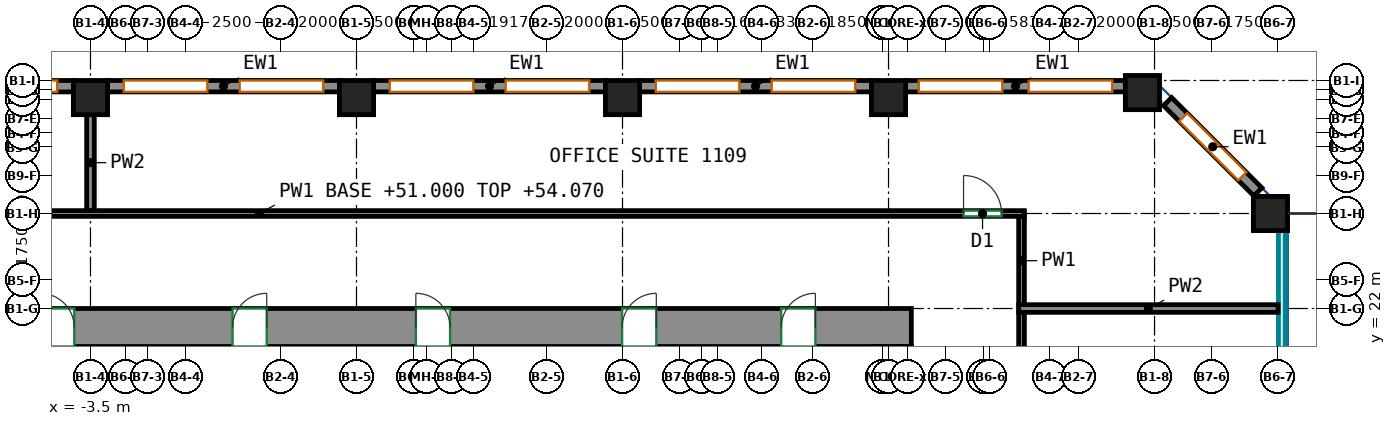
"""IFC4 building model, lengths in metres.
Left out: names, types, materials, properties, quantities, classifications, styles, units other than length and angle.
Written with IfcOpenShell. Run it as: python <this file> out.ifc"""

import sys

from ifc_helpers import new_model, si_unit, direction, frame, frame_2d, origin, origin_2d, place, context, subcontext, project, spatial, rectangle, extrude, source, transform, mapped, element, fill, save


model = new_model("IFC4")
c1 = context("Model", 3, precision=1e-05, world=origin(), true_north=direction((0.0, 1.0)))
c2 = subcontext(c1, "Body", "Model", "MODEL_VIEW")
j1 = project(units=[si_unit("LENGTHUNIT", "METRE"), si_unit("PLANEANGLEUNIT", "RADIAN")], contexts=[c1])
p1 = place(None, origin())
s1 = spatial("IfcSite", under=j1, at=p1, CompositionType="ELEMENT")
p2 = place(p1, origin())
s2 = spatial("IfcBuilding", under=s1, at=p2, CompositionType="ELEMENT")
p3 = place(p2, frame((0.0, 0.0, 51.0)))
s3 = spatial("IfcBuildingStorey", under=s2, at=p3, CompositionType="ELEMENT", Elevation=51.0)
m1 = source(origin(), c2, "Body", "SweptSolid", [
    extrude(rectangle(XDim=0.9, YDim=0.9, at=origin_2d()), origin(), (0.0, 0.0, 1.0), 3.72),
])
for number, where, z_axis, x_axis in (
    (1, (-3.5, 27.55, 0.0), (0.0, 0.0, 1.0), (1.0, 0.0, 0.0)),
    (2, (3.5, 27.55, 0.0), (0.0, 0.0, 1.0), (1.0, 0.0, 0.0)),
    (3, (10.5, 27.55, 0.0), (0.0, 0.0, 1.0), (1.0, 0.0, 0.0)),
    (4, (17.5, 27.55, 0.0), (0.0, 0.0, 1.0), (1.0, 0.0, 0.0)),
    (5, (24.182, 27.682, 0.0), (0.0, 0.0, 1.0), (1.0, 0.0, 0.0)),
    (6, (27.55, 24.5, 0.0), (0.0, 0.0, 1.0), (1.0, 0.0, 0.0)),
):
    element("IfcColumn", number, at=place(p3, frame(where, z_axis=z_axis, x_axis=x_axis)), inside=s3, PredefinedType="COLUMN", context=c2, shape_type="MappedRepresentation", body=[
        mapped(m1, transform((0.0, 0.0, 0.0))),
    ])
m2 = source(origin(), c2, "Body", "SweptSolid", [
    extrude(rectangle(XDim=34.1, YDim=1.0, at=frame_2d((17.05, 0.0))), origin(), (0.0, 0.0, 1.0), 3.72),
])
p4 = place(p3, frame((-16.0, 21.5, 0.0), z_axis=(0.0, 0.0, 1.0), x_axis=(1.0, 0.0, 0.0)))
e7 = element("IfcWall", 7, at=p4, inside=s3, PredefinedType="SHEAR", context=c2, shape_type="MappedRepresentation", body=[
    mapped(m2, transform((0.0, 0.0, 0.0))),
])
p5 = place(p4, frame((6.108, 0.0, 0.0)))
e8 = element("IfcOpeningElement", 8, at=p5, cuts=e7, PredefinedType="OPENING", context=c2, shape_type="SweptSolid", body=[
    extrude(rectangle(XDim=0.9, YDim=2.1, at=frame_2d((0.45, 1.05))), frame((0.0, 0.51, 0.0), z_axis=(0.0, -1.0, 0.0), x_axis=(1.0, 0.0, 0.0)), (0.0, 0.0, 1.0), 1.02),
])
p6 = place(p4, frame((11.173, 0.0, 0.0)))
e9 = element("IfcOpeningElement", 9, at=p6, cuts=e7, PredefinedType="OPENING", context=c2, shape_type="SweptSolid", body=[
    extrude(rectangle(XDim=0.9, YDim=2.1, at=frame_2d((0.45, 1.05))), frame((0.0, 0.51, 0.0), z_axis=(0.0, -1.0, 0.0), x_axis=(1.0, 0.0, 0.0)), (0.0, 0.0, 1.0), 1.02),
])
p7 = place(p4, frame((16.238, 0.0, 0.0)))
e10 = element("IfcOpeningElement", 10, at=p7, cuts=e7, PredefinedType="OPENING", context=c2, shape_type="SweptSolid", body=[
    extrude(rectangle(XDim=0.9, YDim=2.1, at=frame_2d((0.45, 1.05))), frame((0.0, 0.51, 0.0), z_axis=(0.0, -1.0, 0.0), x_axis=(1.0, 0.0, 0.0)), (0.0, 0.0, 1.0), 1.02),
])
p8 = place(p4, frame((21.062, 0.0, 0.0)))
e11 = element("IfcOpeningElement", 11, at=p8, cuts=e7, PredefinedType="OPENING", context=c2, shape_type="SweptSolid", body=[
    extrude(rectangle(XDim=0.9, YDim=2.1, at=frame_2d((0.45, 1.05))), frame((0.0, 0.51, 0.0), z_axis=(0.0, -1.0, 0.0), x_axis=(1.0, 0.0, 0.0)), (0.0, 0.0, 1.0), 1.02),
])
p9 = place(p4, frame((26.489, 0.0, 0.0)))
e12 = element("IfcOpeningElement", 12, at=p9, cuts=e7, PredefinedType="OPENING", context=c2, shape_type="SweptSolid", body=[
    extrude(rectangle(XDim=0.9, YDim=2.1, at=frame_2d((0.45, 1.05))), frame((0.0, 0.51, 0.0), z_axis=(0.0, -1.0, 0.0), x_axis=(1.0, 0.0, 0.0)), (0.0, 0.0, 1.0), 1.02),
])
p10 = place(p4, frame((2.525, 0.0, 0.0)))
e13 = element("IfcOpeningElement", 13, at=p10, cuts=e7, PredefinedType="OPENING", context=c2, shape_type="SweptSolid", body=[
    extrude(rectangle(XDim=0.9, YDim=2.1, at=frame_2d((0.45, 1.05))), frame((0.0, 0.51, 0.0), z_axis=(0.0, -1.0, 0.0), x_axis=(1.0, 0.0, 0.0)), (0.0, 0.0, 1.0), 1.02),
])
p11 = place(p4, frame((30.675, 0.0, 0.0)))
e14 = element("IfcOpeningElement", 14, at=p11, cuts=e7, PredefinedType="OPENING", context=c2, shape_type="SweptSolid", body=[
    extrude(rectangle(XDim=0.9, YDim=2.1, at=frame_2d((0.45, 1.05))), frame((0.0, 0.51, 0.0), z_axis=(0.0, -1.0, 0.0), x_axis=(1.0, 0.0, 0.0)), (0.0, 0.0, 1.0), 1.02),
])
m3 = source(origin(), c2, "Body", "SweptSolid", [
    extrude(rectangle(XDim=3.359, YDim=0.3, at=frame_2d((1.679, 0.0))), origin(), (0.0, 0.0, 1.0), 3.72),
])
p12 = place(p3, frame((27.219, 25.069, 0.0), z_axis=(0.0, 0.0, 1.0), x_axis=(-0.707070438228, 0.707143122278, 0.0)))
e15 = element("IfcWall", 15, at=p12, inside=s3, PredefinedType="SOLIDWALL", context=c2, shape_type="MappedRepresentation", body=[
    mapped(m3, transform((0.0, 0.0, 0.0))),
])
p13 = place(p12, frame((0.579, 0.0, 0.7)))
e16 = element("IfcOpeningElement", 16, at=p13, cuts=e15, PredefinedType="OPENING", context=c2, shape_type="SweptSolid", body=[
    extrude(rectangle(XDim=2.2, YDim=2.25, at=frame_2d((1.1, 1.125))), frame((0.0, 0.16, 0.0), z_axis=(0.0, -1.0, 0.0), x_axis=(1.0, 0.0, 0.0)), (0.0, 0.0, 1.0), 0.32),
])
m4 = source(origin(), c2, "Body", "SweptSolid", [
    extrude(rectangle(XDim=5.782, YDim=0.3, at=frame_2d((2.891, 0.0))), origin(), (0.0, 0.0, 1.0), 3.72),
])
p14 = place(p3, frame((23.732, 27.85, 0.0), z_axis=(0.0, 0.0, 1.0), x_axis=(-1.0, 0.0, 0.0)))
e17 = element("IfcWall", 17, at=p14, inside=s3, PredefinedType="SOLIDWALL", context=c2, shape_type="MappedRepresentation", body=[
    mapped(m4, transform((0.0, 0.0, 0.0))),
])
p15 = place(p14, frame((0.345, 0.0, 0.7)))
e18 = element("IfcOpeningElement", 18, at=p15, cuts=e17, PredefinedType="OPENING", context=c2, shape_type="SweptSolid", body=[
    extrude(rectangle(XDim=2.2, YDim=2.25, at=frame_2d((1.1, 1.125))), frame((0.0, 0.16, 0.0), z_axis=(0.0, -1.0, 0.0), x_axis=(1.0, 0.0, 0.0)), (0.0, 0.0, 1.0), 0.32),
])
p16 = place(p14, frame((3.236, 0.0, 0.7)))
e19 = element("IfcOpeningElement", 19, at=p16, cuts=e17, PredefinedType="OPENING", context=c2, shape_type="SweptSolid", body=[
    extrude(rectangle(XDim=2.2, YDim=2.25, at=frame_2d((1.1, 1.125))), frame((0.0, 0.16, 0.0), z_axis=(0.0, -1.0, 0.0), x_axis=(1.0, 0.0, 0.0)), (0.0, 0.0, 1.0), 0.32),
])
m5 = source(origin(), c2, "Body", "SweptSolid", [
    extrude(rectangle(XDim=6.1, YDim=0.3, at=frame_2d((3.05, 0.0))), origin(), (0.0, 0.0, 1.0), 3.72),
])
p17 = place(p3, frame((17.05, 27.85, 0.0), z_axis=(0.0, 0.0, 1.0), x_axis=(-1.0, 0.0, 0.0)))
e20 = element("IfcWall", 20, at=p17, inside=s3, PredefinedType="SOLIDWALL", context=c2, shape_type="MappedRepresentation", body=[
    mapped(m5, transform((0.0, 0.0, 0.0))),
])
p18 = place(p17, frame((0.425, 0.0, 0.7)))
e21 = element("IfcOpeningElement", 21, at=p18, cuts=e20, PredefinedType="OPENING", context=c2, shape_type="SweptSolid", body=[
    extrude(rectangle(XDim=2.2, YDim=2.25, at=frame_2d((1.1, 1.125))), frame((0.0, 0.16, 0.0), z_axis=(0.0, -1.0, 0.0), x_axis=(1.0, 0.0, 0.0)), (0.0, 0.0, 1.0), 0.32),
])
p19 = place(p17, frame((3.475, 0.0, 0.7)))
e22 = element("IfcOpeningElement", 22, at=p19, cuts=e20, PredefinedType="OPENING", context=c2, shape_type="SweptSolid", body=[
    extrude(rectangle(XDim=2.2, YDim=2.25, at=frame_2d((1.1, 1.125))), frame((0.0, 0.16, 0.0), z_axis=(0.0, -1.0, 0.0), x_axis=(1.0, 0.0, 0.0)), (0.0, 0.0, 1.0), 0.32),
])
p20 = place(p3, frame((10.05, 27.85, 0.0), z_axis=(0.0, 0.0, 1.0), x_axis=(-1.0, 0.0, 0.0)))
e23 = element("IfcWall", 23, at=p20, inside=s3, PredefinedType="SOLIDWALL", context=c2, shape_type="MappedRepresentation", body=[
    mapped(m5, transform((0.0, 0.0, 0.0))),
])
p21 = place(p20, frame((0.425, 0.0, 0.7)))
e24 = element("IfcOpeningElement", 24, at=p21, cuts=e23, PredefinedType="OPENING", context=c2, shape_type="SweptSolid", body=[
    extrude(rectangle(XDim=2.2, YDim=2.25, at=frame_2d((1.1, 1.125))), frame((0.0, 0.16, 0.0), z_axis=(0.0, -1.0, 0.0), x_axis=(1.0, 0.0, 0.0)), (0.0, 0.0, 1.0), 0.32),
])
p22 = place(p20, frame((3.475, 0.0, 0.7)))
e25 = element("IfcOpeningElement", 25, at=p22, cuts=e23, PredefinedType="OPENING", context=c2, shape_type="SweptSolid", body=[
    extrude(rectangle(XDim=2.2, YDim=2.25, at=frame_2d((1.1, 1.125))), frame((0.0, 0.16, 0.0), z_axis=(0.0, -1.0, 0.0), x_axis=(1.0, 0.0, 0.0)), (0.0, 0.0, 1.0), 0.32),
])
p23 = place(p3, frame((3.05, 27.85, 0.0), z_axis=(0.0, 0.0, 1.0), x_axis=(-1.0, 0.0, 0.0)))
e26 = element("IfcWall", 26, at=p23, inside=s3, PredefinedType="SOLIDWALL", context=c2, shape_type="MappedRepresentation", body=[
    mapped(m5, transform((0.0, 0.0, 0.0))),
])
p24 = place(p23, frame((0.425, 0.0, 0.7)))
e27 = element("IfcOpeningElement", 27, at=p24, cuts=e26, PredefinedType="OPENING", context=c2, shape_type="SweptSolid", body=[
    extrude(rectangle(XDim=2.2, YDim=2.25, at=frame_2d((1.1, 1.125))), frame((0.0, 0.16, 0.0), z_axis=(0.0, -1.0, 0.0), x_axis=(1.0, 0.0, 0.0)), (0.0, 0.0, 1.0), 0.32),
])
p25 = place(p23, frame((3.475, 0.0, 0.7)))
e28 = element("IfcOpeningElement", 28, at=p25, cuts=e26, PredefinedType="OPENING", context=c2, shape_type="SweptSolid", body=[
    extrude(rectangle(XDim=2.2, YDim=2.25, at=frame_2d((1.1, 1.125))), frame((0.0, 0.16, 0.0), z_axis=(0.0, -1.0, 0.0), x_axis=(1.0, 0.0, 0.0)), (0.0, 0.0, 1.0), 0.32),
])
p26 = place(p3, frame((-3.95, 27.85, 0.0), z_axis=(0.0, 0.0, 1.0), x_axis=(-1.0, 0.0, 0.0)))
e29 = element("IfcWall", 29, at=p26, inside=s3, PredefinedType="SOLIDWALL", context=c2, shape_type="MappedRepresentation", body=[
    mapped(m5, transform((0.0, 0.0, 0.0))),
])
p27 = place(p26, frame((0.425, 0.0, 0.7)))
e30 = element("IfcOpeningElement", 30, at=p27, cuts=e29, PredefinedType="OPENING", context=c2, shape_type="SweptSolid", body=[
    extrude(rectangle(XDim=2.2, YDim=2.25, at=frame_2d((1.1, 1.125))), frame((0.0, 0.16, 0.0), z_axis=(0.0, -1.0, 0.0), x_axis=(1.0, 0.0, 0.0)), (0.0, 0.0, 1.0), 0.32),
])
p28 = place(p26, frame((3.475, 0.0, 0.7)))
e31 = element("IfcOpeningElement", 31, at=p28, cuts=e29, PredefinedType="OPENING", context=c2, shape_type="SweptSolid", body=[
    extrude(rectangle(XDim=2.2, YDim=2.25, at=frame_2d((1.1, 1.125))), frame((0.0, 0.16, 0.0), z_axis=(0.0, -1.0, 0.0), x_axis=(1.0, 0.0, 0.0)), (0.0, 0.0, 1.0), 0.32),
])
p29 = place(p3, frame((21.0, 17.75, 0.0), z_axis=(0.0, 0.0, 1.0), x_axis=(0.0, 1.0, 0.0)))
e32 = element("IfcWall", 32, at=p29, inside=s3, PredefinedType="PARTITIONING", context=c2, shape_type="SweptSolid", body=[
    extrude(rectangle(XDim=4.16, YDim=0.15, at=frame_2d((2.08, 0.0))), origin(), (0.0, 0.0, 1.0), 3.72),
])
p30 = place(p3, frame((21.0, 22.09, 0.0), z_axis=(0.0, 0.0, 1.0), x_axis=(0.0, 1.0, 0.0)))
e33 = element("IfcWall", 33, at=p30, inside=s3, PredefinedType="PARTITIONING", context=c2, shape_type="SweptSolid", body=[
    extrude(rectangle(XDim=2.335, YDim=0.15, at=frame_2d((1.167, 0.0))), origin(), (0.0, 0.0, 1.0), 3.72),
])
p31 = place(p3, frame((-19.2, 24.5, 0.0), z_axis=(0.0, 0.0, 1.0), x_axis=(1.0, 0.0, 0.0)))
e34 = element("IfcWall", 34, at=p31, inside=s3, PredefinedType="PARTITIONING", context=c2, shape_type="SweptSolid", body=[
    extrude(rectangle(XDim=40.275, YDim=0.15, at=frame_2d((20.137, 0.0))), origin(), (0.0, 0.0, 1.0), 3.07),
])
p32 = place(p31, frame((3.007, 0.0, 0.0)))
e35 = element("IfcOpeningElement", 35, at=p32, cuts=e34, PredefinedType="OPENING", context=c2, shape_type="SweptSolid", body=[
    extrude(rectangle(XDim=0.9, YDim=2.1, at=frame_2d((0.45, 1.05))), frame((0.0, 0.085, 0.0), z_axis=(0.0, -1.0, 0.0), x_axis=(1.0, 0.0, 0.0)), (0.0, 0.0, 1.0), 0.17),
])
p33 = place(p31, frame((5.59, 0.0, 0.0)))
e36 = element("IfcOpeningElement", 36, at=p33, cuts=e34, PredefinedType="OPENING", context=c2, shape_type="SweptSolid", body=[
    extrude(rectangle(XDim=0.9, YDim=2.1, at=frame_2d((0.45, 1.05))), frame((0.0, 0.085, 0.0), z_axis=(0.0, -1.0, 0.0), x_axis=(1.0, 0.0, 0.0)), (0.0, 0.0, 1.0), 0.17),
])
p34 = place(p31, frame((38.674, 0.0, 0.0)))
e37 = element("IfcOpeningElement", 37, at=p34, cuts=e34, PredefinedType="OPENING", context=c2, shape_type="SweptSolid", body=[
    extrude(rectangle(XDim=1.0, YDim=2.1, at=frame_2d((0.5, 1.05))), frame((0.0, 0.085, 0.0), z_axis=(0.0, -1.0, 0.0), x_axis=(1.0, 0.0, 0.0)), (0.0, 0.0, 1.0), 0.17),
])
p35 = place(p3, frame((27.75, 22.0, 0.0), z_axis=(0.0, 0.0, 1.0), x_axis=(-1.0, 0.0, 0.0)))
e38 = element("IfcWall", 38, at=p35, inside=s3, PredefinedType="PARTITIONING", context=c2, shape_type="SweptSolid", body=[
    extrude(rectangle(XDim=6.824, YDim=0.2, at=frame_2d((3.412, 0.0))), origin(), (0.0, 0.0, 1.0), 3.72),
])
p36 = place(p3, frame((-3.5, 24.576, 0.0), z_axis=(0.0, 0.0, 1.0), x_axis=(0.0, 1.0, 0.0)))
e39 = element("IfcWall", 39, at=p36, inside=s3, PredefinedType="PARTITIONING", context=c2, shape_type="SweptSolid", body=[
    extrude(rectangle(XDim=2.524, YDim=0.2, at=frame_2d((1.262, 0.0))), origin(), (0.0, 0.0, 1.0), 3.72),
])
p37 = place(p13, origin())
e40 = element("IfcWindow", 40, at=p37, inside=s3, PartitioningType="SINGLE_PANEL", PredefinedType="WINDOW", context=c2, shape_type="SweptSolid", body=[
    extrude(rectangle(XDim=2.2, YDim=2.25, at=frame_2d((1.1, 1.125))), frame((0.0, 0.03, 0.0), z_axis=(0.0, -1.0, 0.0), x_axis=(1.0, 0.0, 0.0)), (0.0, 0.0, 1.0), 0.06),
])
fill(e16, e40)
p38 = place(p15, origin())
e41 = element("IfcWindow", 41, at=p38, inside=s3, PartitioningType="SINGLE_PANEL", PredefinedType="WINDOW", context=c2, shape_type="SweptSolid", body=[
    extrude(rectangle(XDim=2.2, YDim=2.25, at=frame_2d((1.1, 1.125))), frame((0.0, 0.03, 0.0), z_axis=(0.0, -1.0, 0.0), x_axis=(1.0, 0.0, 0.0)), (0.0, 0.0, 1.0), 0.06),
])
fill(e18, e41)
p39 = place(p16, origin())
e42 = element("IfcWindow", 42, at=p39, inside=s3, PartitioningType="SINGLE_PANEL", PredefinedType="WINDOW", context=c2, shape_type="SweptSolid", body=[
    extrude(rectangle(XDim=2.2, YDim=2.25, at=frame_2d((1.1, 1.125))), frame((0.0, 0.03, 0.0), z_axis=(0.0, -1.0, 0.0), x_axis=(1.0, 0.0, 0.0)), (0.0, 0.0, 1.0), 0.06),
])
fill(e19, e42)
p40 = place(p18, origin())
e43 = element("IfcWindow", 43, at=p40, inside=s3, PartitioningType="SINGLE_PANEL", PredefinedType="WINDOW", context=c2, shape_type="SweptSolid", body=[
    extrude(rectangle(XDim=2.2, YDim=2.25, at=frame_2d((1.1, 1.125))), frame((0.0, 0.03, 0.0), z_axis=(0.0, -1.0, 0.0), x_axis=(1.0, 0.0, 0.0)), (0.0, 0.0, 1.0), 0.06),
])
fill(e21, e43)
p41 = place(p19, origin())
e44 = element("IfcWindow", 44, at=p41, inside=s3, PartitioningType="SINGLE_PANEL", PredefinedType="WINDOW", context=c2, shape_type="SweptSolid", body=[
    extrude(rectangle(XDim=2.2, YDim=2.25, at=frame_2d((1.1, 1.125))), frame((0.0, 0.03, 0.0), z_axis=(0.0, -1.0, 0.0), x_axis=(1.0, 0.0, 0.0)), (0.0, 0.0, 1.0), 0.06),
])
fill(e22, e44)
p42 = place(p21, origin())
e45 = element("IfcWindow", 45, at=p42, inside=s3, PartitioningType="SINGLE_PANEL", PredefinedType="WINDOW", context=c2, shape_type="SweptSolid", body=[
    extrude(rectangle(XDim=2.2, YDim=2.25, at=frame_2d((1.1, 1.125))), frame((0.0, 0.03, 0.0), z_axis=(0.0, -1.0, 0.0), x_axis=(1.0, 0.0, 0.0)), (0.0, 0.0, 1.0), 0.06),
])
fill(e24, e45)
p43 = place(p22, origin())
e46 = element("IfcWindow", 46, at=p43, inside=s3, PartitioningType="SINGLE_PANEL", PredefinedType="WINDOW", context=c2, shape_type="SweptSolid", body=[
    extrude(rectangle(XDim=2.2, YDim=2.25, at=frame_2d((1.1, 1.125))), frame((0.0, 0.03, 0.0), z_axis=(0.0, -1.0, 0.0), x_axis=(1.0, 0.0, 0.0)), (0.0, 0.0, 1.0), 0.06),
])
fill(e25, e46)
p44 = place(p24, origin())
e47 = element("IfcWindow", 47, at=p44, inside=s3, PartitioningType="SINGLE_PANEL", PredefinedType="WINDOW", context=c2, shape_type="SweptSolid", body=[
    extrude(rectangle(XDim=2.2, YDim=2.25, at=frame_2d((1.1, 1.125))), frame((0.0, 0.03, 0.0), z_axis=(0.0, -1.0, 0.0), x_axis=(1.0, 0.0, 0.0)), (0.0, 0.0, 1.0), 0.06),
])
fill(e27, e47)
p45 = place(p25, origin())
e48 = element("IfcWindow", 48, at=p45, inside=s3, PartitioningType="SINGLE_PANEL", PredefinedType="WINDOW", context=c2, shape_type="SweptSolid", body=[
    extrude(rectangle(XDim=2.2, YDim=2.25, at=frame_2d((1.1, 1.125))), frame((0.0, 0.03, 0.0), z_axis=(0.0, -1.0, 0.0), x_axis=(1.0, 0.0, 0.0)), (0.0, 0.0, 1.0), 0.06),
])
fill(e28, e48)
p46 = place(p27, origin())
e49 = element("IfcWindow", 49, at=p46, inside=s3, PartitioningType="SINGLE_PANEL", PredefinedType="WINDOW", context=c2, shape_type="SweptSolid", body=[
    extrude(rectangle(XDim=2.2, YDim=2.25, at=frame_2d((1.1, 1.125))), frame((0.0, 0.03, 0.0), z_axis=(0.0, -1.0, 0.0), x_axis=(1.0, 0.0, 0.0)), (0.0, 0.0, 1.0), 0.06),
])
fill(e30, e49)
p47 = place(p6, origin())
e50 = element("IfcDoor", 50, at=p47, inside=s3, OperationType="SINGLE_SWING_LEFT", PredefinedType="DOOR", context=c2, shape_type="SweptSolid", body=[
    extrude(rectangle(XDim=0.9, YDim=2.1, at=frame_2d((0.45, 1.05))), frame((0.0, -0.355, 0.0), z_axis=(0.0, -1.0, 0.0), x_axis=(1.0, 0.0, 0.0)), (0.0, 0.0, 1.0), 0.05),
])
fill(e9, e50)
p48 = place(p7, origin())
e51 = element("IfcDoor", 51, at=p48, inside=s3, OperationType="SINGLE_SWING_RIGHT", PredefinedType="DOOR", context=c2, shape_type="SweptSolid", body=[
    extrude(rectangle(XDim=0.9, YDim=2.1, at=frame_2d((0.45, 1.05))), frame((0.0, -0.355, 0.0), z_axis=(0.0, -1.0, 0.0), x_axis=(1.0, 0.0, 0.0)), (0.0, 0.0, 1.0), 0.05),
])
fill(e10, e51)
p49 = place(p8, origin())
e52 = element("IfcDoor", 52, at=p49, inside=s3, OperationType="SINGLE_SWING_LEFT", PredefinedType="DOOR", context=c2, shape_type="SweptSolid", body=[
    extrude(rectangle(XDim=0.9, YDim=2.1, at=frame_2d((0.45, 1.05))), frame((0.0, -0.355, 0.0), z_axis=(0.0, -1.0, 0.0), x_axis=(1.0, 0.0, 0.0)), (0.0, 0.0, 1.0), 0.05),
])
fill(e11, e52)
p50 = place(p9, origin())
e53 = element("IfcDoor", 53, at=p50, inside=s3, OperationType="SINGLE_SWING_RIGHT", PredefinedType="DOOR", context=c2, shape_type="SweptSolid", body=[
    extrude(rectangle(XDim=0.9, YDim=2.1, at=frame_2d((0.45, 1.05))), frame((0.0, -0.355, 0.0), z_axis=(0.0, -1.0, 0.0), x_axis=(1.0, 0.0, 0.0)), (0.0, 0.0, 1.0), 0.05),
])
fill(e12, e53)
p51 = place(p11, origin())
e54 = element("IfcDoor", 54, at=p51, inside=s3, OperationType="SINGLE_SWING_RIGHT", PredefinedType="DOOR", context=c2, shape_type="SweptSolid", body=[
    extrude(rectangle(XDim=0.9, YDim=2.1, at=frame_2d((0.45, 1.05))), frame((0.0, -0.355, 0.0), z_axis=(0.0, -1.0, 0.0), x_axis=(1.0, 0.0, 0.0)), (0.0, 0.0, 1.0), 0.05),
])
fill(e14, e54)
p52 = place(p34, origin())
e55 = element("IfcDoor", 55, at=p52, inside=s3, OperationType="SINGLE_SWING_LEFT", PredefinedType="DOOR", context=c2, shape_type="SweptSolid", body=[
    extrude(rectangle(XDim=1.0, YDim=2.1, at=frame_2d((0.5, 1.05))), frame((0.0, 0.025, 0.0), z_axis=(0.0, -1.0, 0.0), x_axis=(1.0, 0.0, 0.0)), (0.0, 0.0, 1.0), 0.05),
])
fill(e37, e55)
save(model, sys.argv[1])
